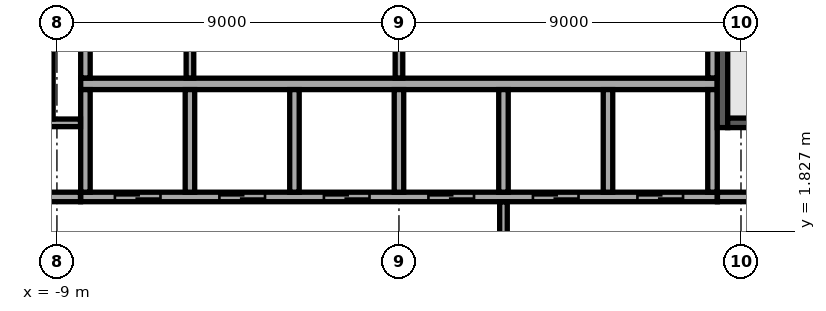
"""IFC4 building model, lengths in metres.
Left out: names, types, materials, properties, quantities, classifications, styles, units other than length and angle.
Written with IfcOpenShell. Run it as: python <this file> out.ifc"""

import sys

from ifc_helpers import new_model, si_unit, direction, frame, frame_2d, origin, place, context, subcontext, project, spatial, rectangle, extrude, element, fill, save


model = new_model("IFC4")
c1 = context("Model", 3, precision=1e-05, world=origin(), true_north=direction((0.0, 1.0)))
c2 = subcontext(c1, "Body", "Model", "MODEL_VIEW")
j1 = project(units=[si_unit("LENGTHUNIT", "METRE"), si_unit("PLANEANGLEUNIT", "RADIAN")], contexts=[c1])
p1 = place(None, origin())
s1 = spatial("IfcSite", under=j1, at=p1, CompositionType="ELEMENT")
p2 = place(p1, origin())
s2 = spatial("IfcBuilding", under=s1, at=p2, CompositionType="ELEMENT")
p3 = place(p2, frame((0.0, 0.0, 135.7)))
s3 = spatial("IfcBuildingStorey", under=s2, at=p3, CompositionType="ELEMENT", Elevation=135.7)
p4 = place(p3, frame((-8.375, 5.7, 0.0), z_axis=(0.0, 0.0, 1.0), x_axis=(1.0, 0.0, 0.0)))
e1 = element("IfcWall", 1, at=p4, inside=s3, PredefinedType="SOLIDWALL", context=c2, shape_type="SweptSolid", body=[
    extrude(rectangle(XDim=16.75, YDim=0.3, at=frame_2d((8.375, 0.0))), origin(), (0.0, 0.0, 1.0), 3.6),
])
p5 = place(p3, frame((-8.375, 2.725, 0.0), z_axis=(0.0, 0.0, 1.0), x_axis=(1.0, 0.0, 0.0)))
e2 = element("IfcWall", 2, at=p5, inside=s3, PredefinedType="SOLIDWALL", context=c2, shape_type="SweptSolid", body=[
    extrude(rectangle(XDim=16.75, YDim=0.25, at=frame_2d((8.375, 0.0))), origin(), (0.0, 0.0, 1.0), 3.6),
])
p6 = place(p5, frame((0.9, 0.0, 0.0)))
e3 = element("IfcOpeningElement", 3, at=p6, cuts=e2, PredefinedType="OPENING", context=c2, shape_type="SweptSolid", body=[
    extrude(rectangle(XDim=1.2, YDim=2.1, at=frame_2d((0.6, 1.05))), frame((0.0, 0.135, 0.0), z_axis=(0.0, -1.0, 0.0), x_axis=(1.0, 0.0, 0.0)), (0.0, 0.0, 1.0), 0.27),
])
p7 = place(p5, frame((3.65, 0.0, 0.0)))
e4 = element("IfcOpeningElement", 4, at=p7, cuts=e2, PredefinedType="OPENING", context=c2, shape_type="SweptSolid", body=[
    extrude(rectangle(XDim=1.2, YDim=2.1, at=frame_2d((0.6, 1.05))), frame((0.0, 0.135, 0.0), z_axis=(0.0, -1.0, 0.0), x_axis=(1.0, 0.0, 0.0)), (0.0, 0.0, 1.0), 0.27),
])
p8 = place(p5, frame((6.4, 0.0, 0.0)))
e5 = element("IfcOpeningElement", 5, at=p8, cuts=e2, PredefinedType="OPENING", context=c2, shape_type="SweptSolid", body=[
    extrude(rectangle(XDim=1.2, YDim=2.1, at=frame_2d((0.6, 1.05))), frame((0.0, 0.135, 0.0), z_axis=(0.0, -1.0, 0.0), x_axis=(1.0, 0.0, 0.0)), (0.0, 0.0, 1.0), 0.27),
])
p9 = place(p5, frame((9.15, 0.0, 0.0)))
e6 = element("IfcOpeningElement", 6, at=p9, cuts=e2, PredefinedType="OPENING", context=c2, shape_type="SweptSolid", body=[
    extrude(rectangle(XDim=1.2, YDim=2.1, at=frame_2d((0.6, 1.05))), frame((0.0, 0.135, 0.0), z_axis=(0.0, -1.0, 0.0), x_axis=(1.0, 0.0, 0.0)), (0.0, 0.0, 1.0), 0.27),
])
p10 = place(p5, frame((11.9, 0.0, 0.0)))
e7 = element("IfcOpeningElement", 7, at=p10, cuts=e2, PredefinedType="OPENING", context=c2, shape_type="SweptSolid", body=[
    extrude(rectangle(XDim=1.2, YDim=2.1, at=frame_2d((0.6, 1.05))), frame((0.0, 0.135, 0.0), z_axis=(0.0, -1.0, 0.0), x_axis=(1.0, 0.0, 0.0)), (0.0, 0.0, 1.0), 0.27),
])
p11 = place(p5, frame((14.65, 0.0, 0.0)))
e8 = element("IfcOpeningElement", 8, at=p11, cuts=e2, PredefinedType="OPENING", context=c2, shape_type="SweptSolid", body=[
    extrude(rectangle(XDim=1.2, YDim=2.1, at=frame_2d((0.6, 1.05))), frame((0.0, 0.135, 0.0), z_axis=(0.0, -1.0, 0.0), x_axis=(1.0, 0.0, 0.0)), (0.0, 0.0, 1.0), 0.27),
])
for number, where, z_axis, x_axis in (
    (9, (-8.25, 2.85, 0.0), (0.0, 0.0, 1.0), (0.0, 1.0, 0.0)),
    (10, (-5.5, 2.85, 0.0), (0.0, 0.0, 1.0), (0.0, 1.0, 0.0)),
    (11, (-2.75, 2.85, 0.0), (0.0, 0.0, 1.0), (0.0, 1.0, 0.0)),
    (12, (0.0, 2.85, 0.0), (0.0, 0.0, 1.0), (0.0, 1.0, 0.0)),
    (13, (2.75, 2.85, 0.0), (0.0, 0.0, 1.0), (0.0, 1.0, 0.0)),
    (14, (5.5, 2.85, 0.0), (0.0, 0.0, 1.0), (0.0, 1.0, 0.0)),
    (15, (8.25, 2.85, 0.0), (0.0, 0.0, 1.0), (0.0, 1.0, 0.0)),
):
    element("IfcWall", number, at=place(p3, frame(where, z_axis=z_axis, x_axis=x_axis)), inside=s3, PredefinedType="SOLIDWALL", context=c2, shape_type="SweptSolid", body=[
        extrude(rectangle(XDim=2.7, YDim=0.25, at=frame_2d((1.35, 0.0))), origin(), (0.0, 0.0, 1.0), 3.6),
    ])
p12 = place(p3, frame((8.512, 4.55, 0.0), z_axis=(0.0, 0.0, 1.0), x_axis=(0.0, 1.0, 0.0)))
e16 = element("IfcWall", 16, at=p12, inside=s3, PredefinedType="SOLIDWALL", context=c2, shape_type="SweptSolid", body=[
    extrude(rectangle(XDim=7.25, YDim=0.275, at=frame_2d((3.625, 0.0))), origin(), (0.0, 0.0, 1.0), 3.6),
])
p13 = place(p12, frame((6.0, 0.0, 0.0)))
e17 = element("IfcOpeningElement", 17, at=p13, cuts=e16, PredefinedType="OPENING", context=c2, shape_type="SweptSolid", body=[
    extrude(rectangle(XDim=1.0, YDim=2.1, at=frame_2d((0.5, 1.05))), frame((0.0, 0.147, 0.0), z_axis=(0.0, -1.0, 0.0), x_axis=(1.0, 0.0, 0.0)), (0.0, 0.0, 1.0), 0.295),
])
p14 = place(p3, frame((8.65, 4.675, 0.0), z_axis=(0.0, 0.0, 1.0), x_axis=(1.0, 0.0, 0.0)))
e18 = element("IfcWall", 18, at=p14, inside=s3, PredefinedType="SOLIDWALL", context=c2, shape_type="SweptSolid", body=[
    extrude(rectangle(XDim=3.15, YDim=0.25, at=frame_2d((1.575, 0.0))), origin(), (0.0, 0.0, 1.0), 3.6),
])
p15 = place(p3, frame((2.75, -2.595, 0.0), z_axis=(0.0, 0.0, 1.0), x_axis=(0.0, 1.0, 0.0)))
e19 = element("IfcWall", 19, at=p15, inside=s3, PredefinedType="PARTITIONING", context=c2, shape_type="SweptSolid", body=[
    extrude(rectangle(XDim=5.19, YDim=0.2, at=frame_2d((2.595, 0.0))), origin(), (0.0, 0.0, 1.0), 3.6),
])
p16 = place(p15, frame((1.395, 0.0, 0.0)))
e20 = element("IfcOpeningElement", 20, at=p16, cuts=e19, PredefinedType="OPENING", context=c2, shape_type="SweptSolid", body=[
    extrude(rectangle(XDim=2.4, YDim=2.4, at=frame_2d((1.2, 1.2))), frame((0.0, 0.11, 0.0), z_axis=(0.0, -1.0, 0.0), x_axis=(1.0, 0.0, 0.0)), (0.0, 0.0, 1.0), 0.22),
])
p17 = place(p3, frame((-11.795, 2.725, 0.0), z_axis=(0.0, 0.0, 1.0), x_axis=(1.0, 0.0, 0.0)))
e21 = element("IfcWall", 21, at=p17, inside=s3, PredefinedType="PARTITIONING", context=c2, shape_type="SweptSolid", body=[
    extrude(rectangle(XDim=3.415, YDim=0.25, at=frame_2d((1.708, 0.0))), origin(), (0.0, 0.0, 1.0), 3.6),
])
p18 = place(p17, frame((1.345, 0.0, 0.0)))
e22 = element("IfcOpeningElement", 22, at=p18, cuts=e21, PredefinedType="OPENING", context=c2, shape_type="SweptSolid", body=[
    extrude(rectangle(XDim=0.9, YDim=2.1, at=frame_2d((0.45, 1.05))), frame((0.0, 0.135, 0.0), z_axis=(0.0, -1.0, 0.0), x_axis=(1.0, 0.0, 0.0)), (0.0, 0.0, 1.0), 0.27),
])
p19 = place(p3, frame((8.38, 2.725, 0.0), z_axis=(0.0, 0.0, 1.0), x_axis=(1.0, 0.0, 0.0)))
e23 = element("IfcWall", 23, at=p19, inside=s3, PredefinedType="PARTITIONING", context=c2, shape_type="SweptSolid", body=[
    extrude(rectangle(XDim=3.415, YDim=0.25, at=frame_2d((1.708, 0.0))), origin(), (0.0, 0.0, 1.0), 3.6),
])
p20 = place(p19, frame((1.17, 0.0, 0.0)))
e24 = element("IfcOpeningElement", 24, at=p20, cuts=e23, PredefinedType="OPENING", context=c2, shape_type="SweptSolid", body=[
    extrude(rectangle(XDim=0.9, YDim=2.1, at=frame_2d((0.45, 1.05))), frame((0.0, 0.135, 0.0), z_axis=(0.0, -1.0, 0.0), x_axis=(1.0, 0.0, 0.0)), (0.0, 0.0, 1.0), 0.27),
])
p21 = place(p3, frame((-11.795, 4.675, 0.0), z_axis=(0.0, 0.0, 1.0), x_axis=(1.0, 0.0, 0.0)))
e25 = element("IfcWall", 25, at=p21, inside=s3, PredefinedType="PARTITIONING", context=c2, shape_type="SweptSolid", body=[
    extrude(rectangle(XDim=3.415, YDim=0.2, at=frame_2d((1.708, 0.0))), origin(), (0.0, 0.0, 1.0), 3.6),
])
p22 = place(p3, frame((-9.2, 4.78, 0.0), z_axis=(0.0, 0.0, 1.0), x_axis=(0.0, 1.0, 0.0)))
e26 = element("IfcWall", 26, at=p22, inside=s3, PredefinedType="PARTITIONING", context=c2, shape_type="SweptSolid", body=[
    extrude(rectangle(XDim=7.015, YDim=0.2, at=frame_2d((3.507, 0.0))), origin(), (0.0, 0.0, 1.0), 3.6),
])
p23 = place(p22, frame((2.92, 0.0, 0.0)))
e27 = element("IfcOpeningElement", 27, at=p23, cuts=e26, PredefinedType="OPENING", context=c2, shape_type="SweptSolid", body=[
    extrude(rectangle(XDim=1.0, YDim=2.1, at=frame_2d((0.5, 1.05))), frame((0.0, 0.11, 0.0), z_axis=(0.0, -1.0, 0.0), x_axis=(1.0, 0.0, 0.0)), (0.0, 0.0, 1.0), 0.22),
])
p24 = place(p3, frame((-8.25, 5.855, 0.0), z_axis=(0.0, 0.0, 1.0), x_axis=(0.0, 1.0, 0.0)))
e28 = element("IfcWall", 28, at=p24, inside=s3, PredefinedType="PARTITIONING", context=c2, shape_type="SweptSolid", body=[
    extrude(rectangle(XDim=2.69, YDim=0.25, at=frame_2d((1.345, 0.0))), origin(), (0.0, 0.0, 1.0), 3.6),
])
for number, where, z_axis, x_axis in (
    (29, (-5.5, 5.855, 0.0), (0.0, 0.0, 1.0), (0.0, 1.0, 0.0)),
    (30, (0.0, 5.855, 0.0), (0.0, 0.0, 1.0), (0.0, 1.0, 0.0)),
):
    element("IfcWall", number, at=place(p3, frame(where, z_axis=z_axis, x_axis=x_axis)), inside=s3, PredefinedType="PARTITIONING", context=c2, shape_type="SweptSolid", body=[
        extrude(rectangle(XDim=2.69, YDim=0.2, at=frame_2d((1.345, 0.0))), origin(), (0.0, 0.0, 1.0), 3.6),
    ])
p25 = place(p3, frame((8.25, 5.855, 0.0), z_axis=(0.0, 0.0, 1.0), x_axis=(0.0, 1.0, 0.0)))
e31 = element("IfcWall", 31, at=p25, inside=s3, PredefinedType="PARTITIONING", context=c2, shape_type="SweptSolid", body=[
    extrude(rectangle(XDim=2.69, YDim=0.25, at=frame_2d((1.345, 0.0))), origin(), (0.0, 0.0, 1.0), 3.6),
])
p26 = place(p6, origin())
e32 = element("IfcDoor", 32, at=p26, inside=s3, OperationType="DOUBLE_DOOR_SLIDING", PredefinedType="DOOR", context=c2, shape_type="SweptSolid", body=[
    extrude(rectangle(XDim=1.2, YDim=2.1, at=frame_2d((0.6, 1.05))), frame((0.0, 0.025, 0.0), z_axis=(0.0, -1.0, 0.0), x_axis=(1.0, 0.0, 0.0)), (0.0, 0.0, 1.0), 0.05),
])
fill(e3, e32)
p27 = place(p7, origin())
e33 = element("IfcDoor", 33, at=p27, inside=s3, OperationType="DOUBLE_DOOR_SLIDING", PredefinedType="DOOR", context=c2, shape_type="SweptSolid", body=[
    extrude(rectangle(XDim=1.2, YDim=2.1, at=frame_2d((0.6, 1.05))), frame((0.0, 0.025, 0.0), z_axis=(0.0, -1.0, 0.0), x_axis=(1.0, 0.0, 0.0)), (0.0, 0.0, 1.0), 0.05),
])
fill(e4, e33)
p28 = place(p8, origin())
e34 = element("IfcDoor", 34, at=p28, inside=s3, OperationType="DOUBLE_DOOR_SLIDING", PredefinedType="DOOR", context=c2, shape_type="SweptSolid", body=[
    extrude(rectangle(XDim=1.2, YDim=2.1, at=frame_2d((0.6, 1.05))), frame((0.0, 0.025, 0.0), z_axis=(0.0, -1.0, 0.0), x_axis=(1.0, 0.0, 0.0)), (0.0, 0.0, 1.0), 0.05),
])
fill(e5, e34)
p29 = place(p9, origin())
e35 = element("IfcDoor", 35, at=p29, inside=s3, OperationType="DOUBLE_DOOR_SLIDING", PredefinedType="DOOR", context=c2, shape_type="SweptSolid", body=[
    extrude(rectangle(XDim=1.2, YDim=2.1, at=frame_2d((0.6, 1.05))), frame((0.0, 0.025, 0.0), z_axis=(0.0, -1.0, 0.0), x_axis=(1.0, 0.0, 0.0)), (0.0, 0.0, 1.0), 0.05),
])
fill(e6, e35)
p30 = place(p10, origin())
e36 = element("IfcDoor", 36, at=p30, inside=s3, OperationType="DOUBLE_DOOR_SLIDING", PredefinedType="DOOR", context=c2, shape_type="SweptSolid", body=[
    extrude(rectangle(XDim=1.2, YDim=2.1, at=frame_2d((0.6, 1.05))), frame((0.0, 0.025, 0.0), z_axis=(0.0, -1.0, 0.0), x_axis=(1.0, 0.0, 0.0)), (0.0, 0.0, 1.0), 0.05),
])
fill(e7, e36)
p31 = place(p11, origin())
e37 = element("IfcDoor", 37, at=p31, inside=s3, OperationType="DOUBLE_DOOR_SLIDING", PredefinedType="DOOR", context=c2, shape_type="SweptSolid", body=[
    extrude(rectangle(XDim=1.2, YDim=2.1, at=frame_2d((0.6, 1.05))), frame((0.0, 0.025, 0.0), z_axis=(0.0, -1.0, 0.0), x_axis=(1.0, 0.0, 0.0)), (0.0, 0.0, 1.0), 0.05),
])
fill(e8, e37)
save(model, sys.argv[1])
